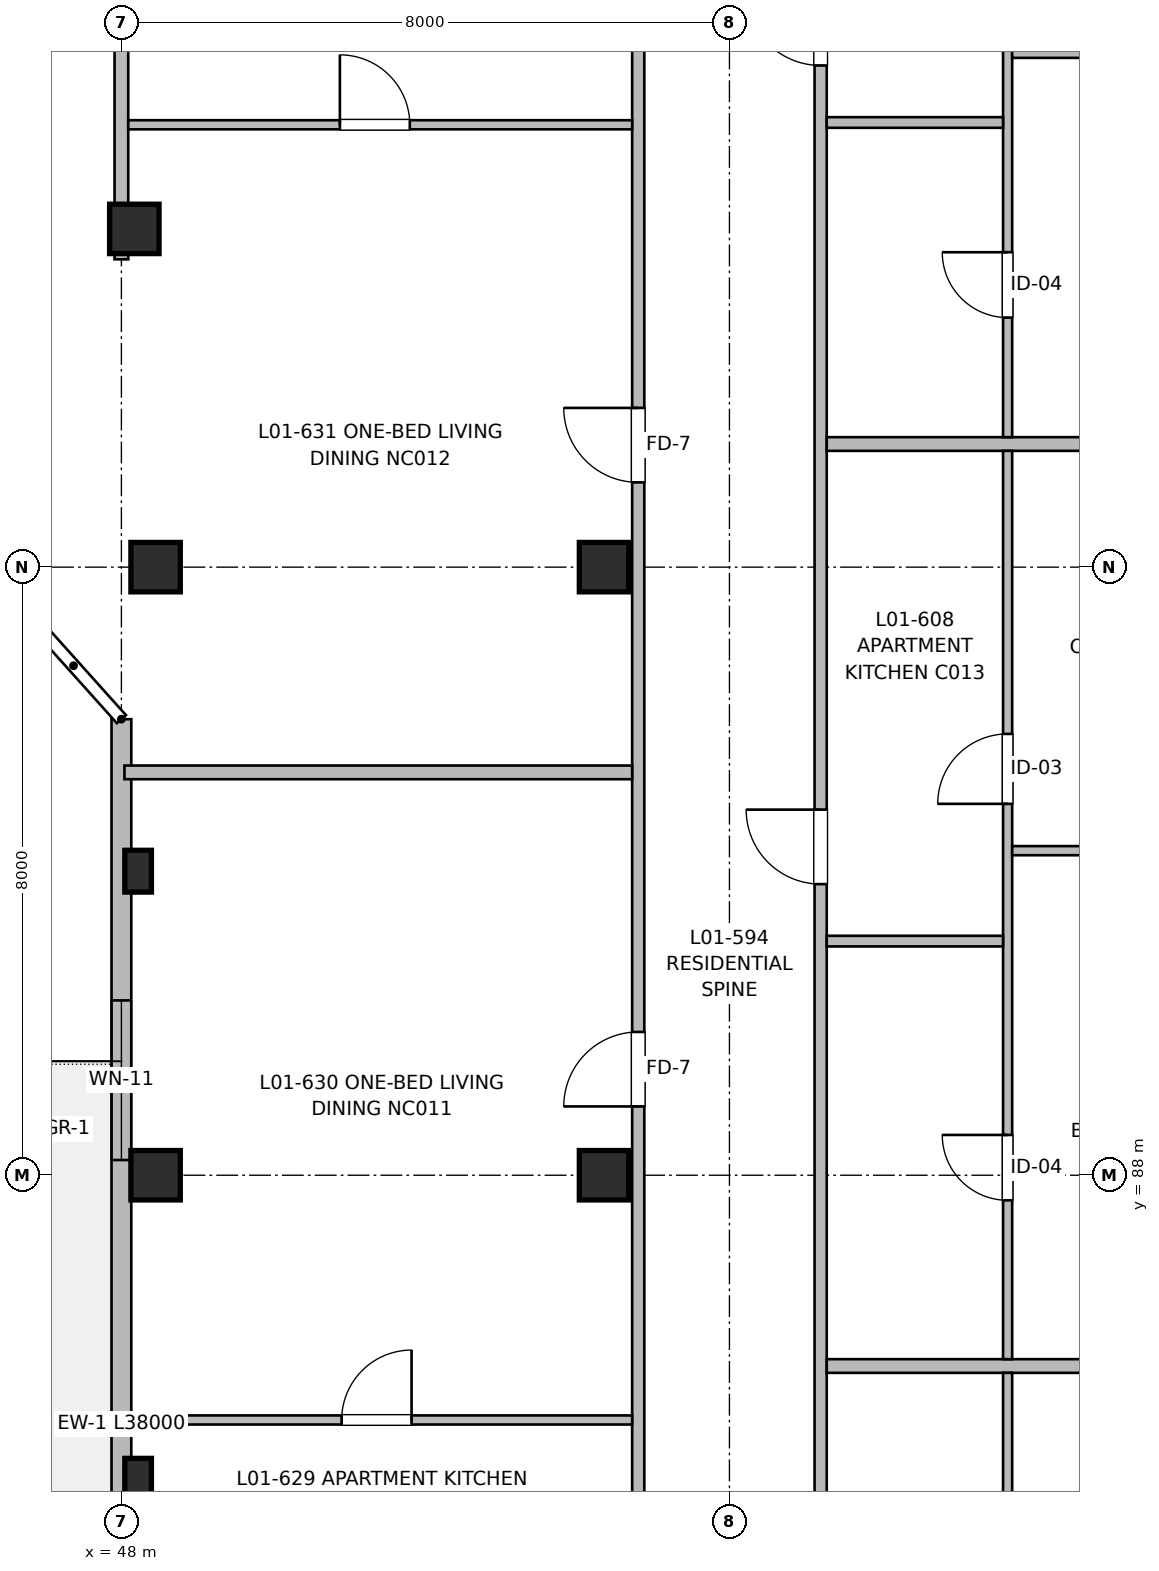
"""IFC4 building model, lengths in metres.
Left out: names, types, materials, properties, quantities, classifications, styles, units other than length and angle.
Written with IfcOpenShell. Run it as: python <this file> out.ifc"""

import sys

from ifc_helpers import new_model, si_unit, direction, frame, frame_2d, origin, origin_2d, place, context, subcontext, project, spatial, rectangle, extrude, element, fill, save


model = new_model("IFC4")
c1 = context("Model", 3, precision=1e-05, world=origin(), true_north=direction((0.0, 1.0)))
c2 = subcontext(c1, "Body", "Model", "MODEL_VIEW")
j1 = project(units=[si_unit("LENGTHUNIT", "METRE"), si_unit("PLANEANGLEUNIT", "RADIAN")], contexts=[c1])
p1 = place(None, origin())
s1 = spatial("IfcSite", under=j1, at=p1, CompositionType="ELEMENT")
p2 = place(p1, origin())
s2 = spatial("IfcBuilding", under=s1, at=p2, CompositionType="ELEMENT")
p3 = place(p2, frame((0.0, 0.0, 4.16)))
s3 = spatial("IfcBuildingStorey", under=s2, at=p3, CompositionType="ELEMENT", Elevation=4.16)
p4 = place(p3, frame((48.17, 100.45, 0.0), z_axis=(0.0, 0.0, 1.0), x_axis=(1.0, 0.0, 0.0)))
e1 = element("IfcColumn", 1, at=p4, inside=s3, PredefinedType="COLUMN", context=c2, shape_type="SweptSolid", body=[
    extrude(rectangle(XDim=0.65, YDim=0.65, at=origin_2d()), origin(), (0.0, 0.0, 1.0), 3.2),
])
for number, where, z_axis, x_axis in (
    (2, (48.22, 84.0, 0.0), (0.0, 0.0, 1.0), (1.0, 0.0, 0.0)),
    (3, (48.22, 92.0, 0.0), (0.0, 0.0, 1.0), (1.0, 0.0, 0.0)),
):
    element("IfcColumn", number, at=place(p3, frame(where, z_axis=z_axis, x_axis=x_axis)), inside=s3, PredefinedType="PILASTER", context=c2, shape_type="SweptSolid", body=[
        extrude(rectangle(XDim=0.35, YDim=0.55, at=origin_2d()), origin(), (0.0, 0.0, 1.0), 3.2),
    ])
for number, where, z_axis, x_axis in (
    (4, (48.45, 88.0, 0.0), (0.0, 0.0, 1.0), (1.0, 0.0, 0.0)),
    (5, (48.45, 96.0, 0.0), (0.0, 0.0, 1.0), (1.0, 0.0, 0.0)),
    (6, (54.35, 88.0, 0.0), (0.0, 0.0, 1.0), (1.0, 0.0, 0.0)),
    (7, (54.35, 96.0, 0.0), (0.0, 0.0, 1.0), (1.0, 0.0, 0.0)),
):
    element("IfcColumn", number, at=place(p3, frame(where, z_axis=z_axis, x_axis=x_axis)), inside=s3, PredefinedType="COLUMN", context=c2, shape_type="SweptSolid", body=[
        extrude(rectangle(XDim=0.65, YDim=0.65, at=origin_2d()), origin(), (0.0, 0.0, 1.0), 3.2),
    ])
p5 = place(p3, frame((48.0, 56.0, 0.0), z_axis=(0.0, 0.0, 1.0), x_axis=(0.0, 1.0, 0.0)))
e8 = element("IfcWall", 8, at=p5, inside=s3, PredefinedType="SOLIDWALL", context=c2, shape_type="SweptSolid", body=[
    extrude(rectangle(XDim=38.0, YDim=0.26, at=frame_2d((19.0, 0.0))), origin(), (0.0, 0.0, 1.0), 2.98),
])
p6 = place(p5, frame((4.95, 0.0, 0.0)))
e9 = element("IfcOpeningElement", 9, at=p6, cuts=e8, PredefinedType="OPENING", context=c2, shape_type="SweptSolid", body=[
    extrude(rectangle(XDim=1.2, YDim=2.2, at=frame_2d((0.6, 1.1))), frame((0.0, 0.14, 0.0), z_axis=(0.0, -1.0, 0.0), x_axis=(1.0, 0.0, 0.0)), (0.0, 0.0, 1.0), 0.28),
])
p7 = place(p5, frame((13.625, 0.0, 0.87)))
e10 = element("IfcOpeningElement", 10, at=p7, cuts=e8, PredefinedType="OPENING", context=c2, shape_type="SweptSolid", body=[
    extrude(rectangle(XDim=1.25, YDim=1.35, at=frame_2d((0.625, 0.675))), frame((0.0, 0.14, 0.0), z_axis=(0.0, -1.0, 0.0), x_axis=(1.0, 0.0, 0.0)), (0.0, 0.0, 1.0), 0.28),
])
p8 = place(p5, frame((23.95, 0.0, 0.82)))
e11 = element("IfcOpeningElement", 11, at=p8, cuts=e8, PredefinedType="OPENING", context=c2, shape_type="SweptSolid", body=[
    extrude(rectangle(XDim=1.3, YDim=1.4, at=frame_2d((0.65, 0.7))), frame((0.0, 0.14, 0.0), z_axis=(0.0, -1.0, 0.0), x_axis=(1.0, 0.0, 0.0)), (0.0, 0.0, 1.0), 0.28),
])
p9 = place(p5, frame((32.2, 0.0, 0.67)))
e12 = element("IfcOpeningElement", 12, at=p9, cuts=e8, PredefinedType="OPENING", context=c2, shape_type="SweptSolid", body=[
    extrude(rectangle(XDim=2.1, YDim=1.55, at=frame_2d((1.05, 0.775))), frame((0.0, 0.14, 0.0), z_axis=(0.0, -1.0, 0.0), x_axis=(1.0, 0.0, 0.0)), (0.0, 0.0, 1.0), 0.28),
])
p10 = place(p3, frame((54.8, 56.18, 0.0), z_axis=(0.0, 0.0, 1.0), x_axis=(0.0, 1.0, 0.0)))
e13 = element("IfcWall", 13, at=p10, inside=s3, PredefinedType="PARTITIONING", context=c2, shape_type="SweptSolid", body=[
    extrude(rectangle(XDim=50.62, YDim=0.16, at=frame_2d((25.31, 0.0))), origin(), (0.0, 0.0, 1.0), 2.935),
])
p11 = place(p10, frame((12.82, 0.0, 0.0)))
e14 = element("IfcOpeningElement", 14, at=p11, cuts=e13, PredefinedType="OPENING", context=c2, shape_type="SweptSolid", body=[
    extrude(rectangle(XDim=1.1, YDim=2.15, at=frame_2d((0.55, 1.075))), frame((0.0, 0.09, 0.0), z_axis=(0.0, -1.0, 0.0), x_axis=(1.0, 0.0, 0.0)), (0.0, 0.0, 1.0), 0.18),
])
p12 = place(p10, frame((19.22, 0.0, 0.0)))
e15 = element("IfcOpeningElement", 15, at=p12, cuts=e13, PredefinedType="OPENING", context=c2, shape_type="SweptSolid", body=[
    extrude(rectangle(XDim=1.6, YDim=2.15, at=frame_2d((0.8, 1.075))), frame((0.0, 0.09, 0.0), z_axis=(0.0, -1.0, 0.0), x_axis=(1.0, 0.0, 0.0)), (0.0, 0.0, 1.0), 0.18),
])
p13 = place(p10, frame((1.8, 0.0, 0.0)))
e16 = element("IfcOpeningElement", 16, at=p13, cuts=e13, PredefinedType="OPENING", context=c2, shape_type="SweptSolid", body=[
    extrude(rectangle(XDim=0.96, YDim=2.15, at=frame_2d((0.48, 1.075))), frame((0.0, 0.09, 0.0), z_axis=(0.0, -1.0, 0.0), x_axis=(1.0, 0.0, 0.0)), (0.0, 0.0, 1.0), 0.18),
])
p14 = place(p10, frame((32.725, 0.0, 0.0)))
e17 = element("IfcOpeningElement", 17, at=p14, cuts=e13, PredefinedType="OPENING", context=c2, shape_type="SweptSolid", body=[
    extrude(rectangle(XDim=0.98, YDim=2.15, at=frame_2d((0.49, 1.075))), frame((0.0, 0.09, 0.0), z_axis=(0.0, -1.0, 0.0), x_axis=(1.0, 0.0, 0.0)), (0.0, 0.0, 1.0), 0.18),
])
p15 = place(p10, frame((40.935, 0.0, 0.0)))
e18 = element("IfcOpeningElement", 18, at=p15, cuts=e13, PredefinedType="OPENING", context=c2, shape_type="SweptSolid", body=[
    extrude(rectangle(XDim=0.98, YDim=2.15, at=frame_2d((0.49, 1.075))), frame((0.0, 0.09, 0.0), z_axis=(0.0, -1.0, 0.0), x_axis=(1.0, 0.0, 0.0)), (0.0, 0.0, 1.0), 0.18),
])
p16 = place(p3, frame((57.2, 56.18, 0.0), z_axis=(0.0, 0.0, 1.0), x_axis=(0.0, 1.0, 0.0)))
e19 = element("IfcWall", 19, at=p16, inside=s3, PredefinedType="PARTITIONING", context=c2, shape_type="SweptSolid", body=[
    extrude(rectangle(XDim=50.62, YDim=0.16, at=frame_2d((25.31, 0.0))), origin(), (0.0, 0.0, 1.0), 2.935),
])
p17 = place(p16, frame((7.68, 0.0, 0.0)))
e20 = element("IfcOpeningElement", 20, at=p17, cuts=e19, PredefinedType="OPENING", context=c2, shape_type="SweptSolid", body=[
    extrude(rectangle(XDim=0.98, YDim=2.15, at=frame_2d((0.49, 1.075))), frame((0.0, 0.09, 0.0), z_axis=(0.0, -1.0, 0.0), x_axis=(1.0, 0.0, 0.0)), (0.0, 0.0, 1.0), 0.18),
])
p18 = place(p16, frame((22.43, 0.0, 0.0)))
e21 = element("IfcOpeningElement", 21, at=p18, cuts=e19, PredefinedType="OPENING", context=c2, shape_type="SweptSolid", body=[
    extrude(rectangle(XDim=1.02, YDim=2.15, at=frame_2d((0.51, 1.075))), frame((0.0, 0.09, 0.0), z_axis=(0.0, -1.0, 0.0), x_axis=(1.0, 0.0, 0.0)), (0.0, 0.0, 1.0), 0.18),
])
p19 = place(p16, frame((35.65, 0.0, 0.0)))
e22 = element("IfcOpeningElement", 22, at=p19, cuts=e19, PredefinedType="OPENING", context=c2, shape_type="SweptSolid", body=[
    extrude(rectangle(XDim=0.98, YDim=2.15, at=frame_2d((0.49, 1.075))), frame((0.0, 0.09, 0.0), z_axis=(0.0, -1.0, 0.0), x_axis=(1.0, 0.0, 0.0)), (0.0, 0.0, 1.0), 0.18),
])
p20 = place(p16, frame((46.42, 0.0, 0.0)))
e23 = element("IfcOpeningElement", 23, at=p20, cuts=e19, PredefinedType="OPENING", context=c2, shape_type="SweptSolid", body=[
    extrude(rectangle(XDim=0.98, YDim=2.15, at=frame_2d((0.49, 1.075))), frame((0.0, 0.09, 0.0), z_axis=(0.0, -1.0, 0.0), x_axis=(1.0, 0.0, 0.0)), (0.0, 0.0, 1.0), 0.18),
])
p21 = place(p3, frame((48.0, 100.05, 0.0), z_axis=(0.0, 0.0, 1.0), x_axis=(0.0, 1.0, 0.0)))
e24 = element("IfcWall", 24, at=p21, inside=s3, PredefinedType="PARTITIONING", context=c2, shape_type="SweptSolid", body=[
    extrude(rectangle(XDim=6.67, YDim=0.18, at=frame_2d((3.335, 0.0))), origin(), (0.0, 0.0, 1.0), 2.68),
])
p22 = place(p3, frame((57.28, 85.49, 0.0), z_axis=(0.0, 0.0, 1.0), x_axis=(1.0, 0.0, 0.0)))
e25 = element("IfcWall", 25, at=p22, inside=s3, PredefinedType="PARTITIONING", context=c2, shape_type="SweptSolid", body=[
    extrude(rectangle(XDim=6.59, YDim=0.18, at=frame_2d((3.295, 0.0))), origin(), (0.0, 0.0, 1.0), 2.935),
])
p23 = place(p3, frame((57.28, 97.62, 0.0), z_axis=(0.0, 0.0, 1.0), x_axis=(1.0, 0.0, 0.0)))
e26 = element("IfcWall", 26, at=p23, inside=s3, PredefinedType="PARTITIONING", context=c2, shape_type="SweptSolid", body=[
    extrude(rectangle(XDim=15.689, YDim=0.18, at=frame_2d((7.845, 0.0))), origin(), (0.0, 0.0, 1.0), 2.935),
])
p24 = place(p3, frame((59.66, 71.43, 0.0), z_axis=(0.0, 0.0, 1.0), x_axis=(0.0, 1.0, 0.0)))
e27 = element("IfcWall", 27, at=p24, inside=s3, PredefinedType="PARTITIONING", context=c2, shape_type="SweptSolid", body=[
    extrude(rectangle(XDim=13.97, YDim=0.12, at=frame_2d((6.985, 0.0))), origin(), (0.0, 0.0, 1.0), 2.935),
])
p25 = place(p24, frame((2.443, 0.0, 0.0)))
e28 = element("IfcOpeningElement", 28, at=p25, cuts=e27, PredefinedType="OPENING", context=c2, shape_type="SweptSolid", body=[
    extrude(rectangle(XDim=0.94, YDim=2.1, at=frame_2d((0.47, 1.05))), frame((0.0, 0.07, 0.0), z_axis=(0.0, -1.0, 0.0), x_axis=(1.0, 0.0, 0.0)), (0.0, 0.0, 1.0), 0.14),
])
p26 = place(p24, frame((8.541, 0.0, 0.0)))
e29 = element("IfcOpeningElement", 29, at=p26, cuts=e27, PredefinedType="OPENING", context=c2, shape_type="SweptSolid", body=[
    extrude(rectangle(XDim=0.92, YDim=2.1, at=frame_2d((0.46, 1.05))), frame((0.0, 0.07, 0.0), z_axis=(0.0, -1.0, 0.0), x_axis=(1.0, 0.0, 0.0)), (0.0, 0.0, 1.0), 0.14),
])
p27 = place(p3, frame((59.66, 85.58, 0.0), z_axis=(0.0, 0.0, 1.0), x_axis=(0.0, 1.0, 0.0)))
e30 = element("IfcWall", 30, at=p27, inside=s3, PredefinedType="PARTITIONING", context=c2, shape_type="SweptSolid", body=[
    extrude(rectangle(XDim=11.95, YDim=0.12, at=frame_2d((5.975, 0.0))), origin(), (0.0, 0.0, 1.0), 2.935),
])
p28 = place(p27, frame((2.09, 0.0, 0.0)))
e31 = element("IfcOpeningElement", 31, at=p28, cuts=e30, PredefinedType="OPENING", context=c2, shape_type="SweptSolid", body=[
    extrude(rectangle(XDim=0.86, YDim=2.1, at=frame_2d((0.43, 1.05))), frame((0.0, 0.07, 0.0), z_axis=(0.0, -1.0, 0.0), x_axis=(1.0, 0.0, 0.0)), (0.0, 0.0, 1.0), 0.14),
])
p29 = place(p27, frame((7.306, 0.0, 0.0)))
e32 = element("IfcOpeningElement", 32, at=p29, cuts=e30, PredefinedType="OPENING", context=c2, shape_type="SweptSolid", body=[
    extrude(rectangle(XDim=0.92, YDim=2.1, at=frame_2d((0.46, 1.05))), frame((0.0, 0.07, 0.0), z_axis=(0.0, -1.0, 0.0), x_axis=(1.0, 0.0, 0.0)), (0.0, 0.0, 1.0), 0.14),
])
p30 = place(p3, frame((57.28, 91.08, 0.0), z_axis=(0.0, 0.0, 1.0), x_axis=(1.0, 0.0, 0.0)))
e33 = element("IfcWall", 33, at=p30, inside=s3, PredefinedType="PARTITIONING", context=c2, shape_type="SweptSolid", body=[
    extrude(rectangle(XDim=2.32, YDim=0.14, at=frame_2d((1.16, 0.0))), origin(), (0.0, 0.0, 1.0), 2.935),
])
p31 = place(p3, frame((59.72, 92.27, 0.0), z_axis=(0.0, 0.0, 1.0), x_axis=(1.0, 0.0, 0.0)))
e34 = element("IfcWall", 34, at=p31, inside=s3, PredefinedType="PARTITIONING", context=c2, shape_type="SweptSolid", body=[
    extrude(rectangle(XDim=7.655, YDim=0.12, at=frame_2d((3.827, 0.0))), origin(), (0.0, 0.0, 1.0), 2.935),
])
p32 = place(p31, frame((1.625, 0.0, 0.0)))
e35 = element("IfcOpeningElement", 35, at=p32, cuts=e34, PredefinedType="OPENING", context=c2, shape_type="SweptSolid", body=[
    extrude(rectangle(XDim=0.9, YDim=2.1, at=frame_2d((0.45, 1.05))), frame((0.0, 0.07, 0.0), z_axis=(0.0, -1.0, 0.0), x_axis=(1.0, 0.0, 0.0)), (0.0, 0.0, 1.0), 0.14),
])
p33 = place(p3, frame((59.66, 97.71, 0.0), z_axis=(0.0, 0.0, 1.0), x_axis=(0.0, 1.0, 0.0)))
e36 = element("IfcWall", 36, at=p33, inside=s3, PredefinedType="PARTITIONING", context=c2, shape_type="SweptSolid", body=[
    extrude(rectangle(XDim=9.01, YDim=0.12, at=frame_2d((4.505, 0.0))), origin(), (0.0, 0.0, 1.0), 2.935),
])
p34 = place(p33, frame((1.573, 0.0, 0.0)))
e37 = element("IfcOpeningElement", 37, at=p34, cuts=e36, PredefinedType="OPENING", context=c2, shape_type="SweptSolid", body=[
    extrude(rectangle(XDim=0.86, YDim=2.1, at=frame_2d((0.43, 1.05))), frame((0.0, 0.07, 0.0), z_axis=(0.0, -1.0, 0.0), x_axis=(1.0, 0.0, 0.0)), (0.0, 0.0, 1.0), 0.14),
])
p35 = place(p33, frame((5.504, 0.0, 0.0)))
e38 = element("IfcOpeningElement", 38, at=p35, cuts=e36, PredefinedType="OPENING", context=c2, shape_type="SweptSolid", body=[
    extrude(rectangle(XDim=0.92, YDim=2.1, at=frame_2d((0.46, 1.05))), frame((0.0, 0.07, 0.0), z_axis=(0.0, -1.0, 0.0), x_axis=(1.0, 0.0, 0.0)), (0.0, 0.0, 1.0), 0.14),
])
p36 = place(p3, frame((57.28, 101.85, 0.0), z_axis=(0.0, 0.0, 1.0), x_axis=(1.0, 0.0, 0.0)))
e39 = element("IfcWall", 39, at=p36, inside=s3, PredefinedType="PARTITIONING", context=c2, shape_type="SweptSolid", body=[
    extrude(rectangle(XDim=2.32, YDim=0.14, at=frame_2d((1.16, 0.0))), origin(), (0.0, 0.0, 1.0), 2.935),
])
p37 = place(p3, frame((59.72, 102.76, 0.0), z_axis=(0.0, 0.0, 1.0), x_axis=(1.0, 0.0, 0.0)))
e40 = element("IfcWall", 40, at=p37, inside=s3, PredefinedType="PARTITIONING", context=c2, shape_type="SweptSolid", body=[
    extrude(rectangle(XDim=4.19, YDim=0.12, at=frame_2d((2.095, 0.0))), origin(), (0.0, 0.0, 1.0), 2.935),
])
p38 = place(p37, frame((1.645, 0.0, 0.0)))
e41 = element("IfcOpeningElement", 41, at=p38, cuts=e40, PredefinedType="OPENING", context=c2, shape_type="SweptSolid", body=[
    extrude(rectangle(XDim=0.9, YDim=2.1, at=frame_2d((0.45, 1.05))), frame((0.0, 0.07, 0.0), z_axis=(0.0, -1.0, 0.0), x_axis=(1.0, 0.0, 0.0)), (0.0, 0.0, 1.0), 0.14),
])
p39 = place(p3, frame((48.04, 93.3, 0.0), z_axis=(0.0, 0.0, 1.0), x_axis=(1.0, 0.0, 0.0)))
e42 = element("IfcWall", 42, at=p39, inside=s3, PredefinedType="PARTITIONING", context=c2, shape_type="SweptSolid", body=[
    extrude(rectangle(XDim=6.68, YDim=0.18, at=frame_2d((3.34, 0.0))), origin(), (0.0, 0.0, 1.0), 2.935),
])
p40 = place(p3, frame((48.13, 84.78, 0.0), z_axis=(0.0, 0.0, 1.0), x_axis=(1.0, 0.0, 0.0)))
e43 = element("IfcWall", 43, at=p40, inside=s3, PredefinedType="PARTITIONING", context=c2, shape_type="SweptSolid", body=[
    extrude(rectangle(XDim=6.59, YDim=0.12, at=frame_2d((3.295, 0.0))), origin(), (0.0, 0.0, 1.0), 2.935),
])
p41 = place(p40, frame((2.768, 0.0, 0.0)))
e44 = element("IfcOpeningElement", 44, at=p41, cuts=e43, PredefinedType="OPENING", context=c2, shape_type="SweptSolid", body=[
    extrude(rectangle(XDim=0.92, YDim=2.1, at=frame_2d((0.46, 1.05))), frame((0.0, 0.07, 0.0), z_axis=(0.0, -1.0, 0.0), x_axis=(1.0, 0.0, 0.0)), (0.0, 0.0, 1.0), 0.14),
])
p42 = place(p3, frame((48.09, 101.82, 0.0), z_axis=(0.0, 0.0, 1.0), x_axis=(1.0, 0.0, 0.0)))
e45 = element("IfcWall", 45, at=p42, inside=s3, PredefinedType="PARTITIONING", context=c2, shape_type="SweptSolid", body=[
    extrude(rectangle(XDim=6.63, YDim=0.12, at=frame_2d((3.315, 0.0))), origin(), (0.0, 0.0, 1.0), 2.935),
])
p43 = place(p42, frame((2.785, 0.0, 0.0)))
e46 = element("IfcOpeningElement", 46, at=p43, cuts=e45, PredefinedType="OPENING", context=c2, shape_type="SweptSolid", body=[
    extrude(rectangle(XDim=0.92, YDim=2.1, at=frame_2d((0.46, 1.05))), frame((0.0, 0.07, 0.0), z_axis=(0.0, -1.0, 0.0), x_axis=(1.0, 0.0, 0.0)), (0.0, 0.0, 1.0), 0.14),
])
p44 = place(p9, origin())
e47 = element("IfcWindow", 47, at=p44, inside=s3, PartitioningType="SINGLE_PANEL", PredefinedType="WINDOW", context=c2, shape_type="SweptSolid", body=[
    extrude(rectangle(XDim=2.1, YDim=1.55, at=frame_2d((1.05, 0.775))), frame((0.0, 0.03, 0.0), z_axis=(0.0, -1.0, 0.0), x_axis=(1.0, 0.0, 0.0)), (0.0, 0.0, 1.0), 0.06),
])
fill(e12, e47)
p45 = place(p28, origin())
e48 = element("IfcDoor", 48, at=p45, inside=s3, OperationType="SINGLE_SWING_RIGHT", PredefinedType="DOOR", context=c2, shape_type="SweptSolid", body=[
    extrude(rectangle(XDim=0.86, YDim=2.1, at=frame_2d((0.43, 1.05))), frame((0.0, 0.025, 0.0), z_axis=(0.0, -1.0, 0.0), x_axis=(1.0, 0.0, 0.0)), (0.0, 0.0, 1.0), 0.05),
])
fill(e31, e48)
p46 = place(p29, origin())
e49 = element("IfcDoor", 49, at=p46, inside=s3, OperationType="SINGLE_SWING_LEFT", PredefinedType="DOOR", context=c2, shape_type="SweptSolid", body=[
    extrude(rectangle(XDim=0.92, YDim=2.1, at=frame_2d((0.46, 1.05))), frame((0.0, 0.025, 0.0), z_axis=(0.0, -1.0, 0.0), x_axis=(1.0, 0.0, 0.0)), (0.0, 0.0, 1.0), 0.05),
])
fill(e32, e49)
p47 = place(p19, origin())
e50 = element("IfcDoor", 50, at=p47, inside=s3, OperationType="SINGLE_SWING_RIGHT", PredefinedType="DOOR", context=c2, shape_type="SweptSolid", body=[
    extrude(rectangle(XDim=0.98, YDim=2.15, at=frame_2d((0.49, 1.075))), frame((0.0, 0.025, 0.0), z_axis=(0.0, -1.0, 0.0), x_axis=(1.0, 0.0, 0.0)), (0.0, 0.0, 1.0), 0.05),
])
fill(e22, e50)
p48 = place(p34, origin())
e51 = element("IfcDoor", 51, at=p48, inside=s3, OperationType="SINGLE_SWING_RIGHT", PredefinedType="DOOR", context=c2, shape_type="SweptSolid", body=[
    extrude(rectangle(XDim=0.86, YDim=2.1, at=frame_2d((0.43, 1.05))), frame((0.0, 0.025, 0.0), z_axis=(0.0, -1.0, 0.0), x_axis=(1.0, 0.0, 0.0)), (0.0, 0.0, 1.0), 0.05),
])
fill(e37, e51)
p49 = place(p20, origin())
e52 = element("IfcDoor", 52, at=p49, inside=s3, OperationType="SINGLE_SWING_RIGHT", PredefinedType="DOOR", context=c2, shape_type="SweptSolid", body=[
    extrude(rectangle(XDim=0.98, YDim=2.15, at=frame_2d((0.49, 1.075))), frame((0.0, 0.025, 0.0), z_axis=(0.0, -1.0, 0.0), x_axis=(1.0, 0.0, 0.0)), (0.0, 0.0, 1.0), 0.05),
])
fill(e23, e52)
p50 = place(p41, origin())
e53 = element("IfcDoor", 53, at=p50, inside=s3, OperationType="SINGLE_SWING_RIGHT", PredefinedType="DOOR", context=c2, shape_type="SweptSolid", body=[
    extrude(rectangle(XDim=0.92, YDim=2.1, at=frame_2d((0.46, 1.05))), frame((0.0, 0.025, 0.0), z_axis=(0.0, -1.0, 0.0), x_axis=(1.0, 0.0, 0.0)), (0.0, 0.0, 1.0), 0.05),
])
fill(e44, e53)
p51 = place(p14, origin())
e54 = element("IfcDoor", 54, at=p51, inside=s3, OperationType="SINGLE_SWING_LEFT", PredefinedType="DOOR", context=c2, shape_type="SweptSolid", body=[
    extrude(rectangle(XDim=0.98, YDim=2.15, at=frame_2d((0.49, 1.075))), frame((0.0, 0.025, 0.0), z_axis=(0.0, -1.0, 0.0), x_axis=(1.0, 0.0, 0.0)), (0.0, 0.0, 1.0), 0.05),
])
fill(e17, e54)
p52 = place(p43, origin())
e55 = element("IfcDoor", 55, at=p52, inside=s3, OperationType="SINGLE_SWING_LEFT", PredefinedType="DOOR", context=c2, shape_type="SweptSolid", body=[
    extrude(rectangle(XDim=0.92, YDim=2.1, at=frame_2d((0.46, 1.05))), frame((0.0, 0.025, 0.0), z_axis=(0.0, -1.0, 0.0), x_axis=(1.0, 0.0, 0.0)), (0.0, 0.0, 1.0), 0.05),
])
fill(e46, e55)
p53 = place(p15, origin())
e56 = element("IfcDoor", 56, at=p53, inside=s3, OperationType="SINGLE_SWING_RIGHT", PredefinedType="DOOR", context=c2, shape_type="SweptSolid", body=[
    extrude(rectangle(XDim=0.98, YDim=2.15, at=frame_2d((0.49, 1.075))), frame((0.0, 0.025, 0.0), z_axis=(0.0, -1.0, 0.0), x_axis=(1.0, 0.0, 0.0)), (0.0, 0.0, 1.0), 0.05),
])
fill(e18, e56)
save(model, sys.argv[1])
